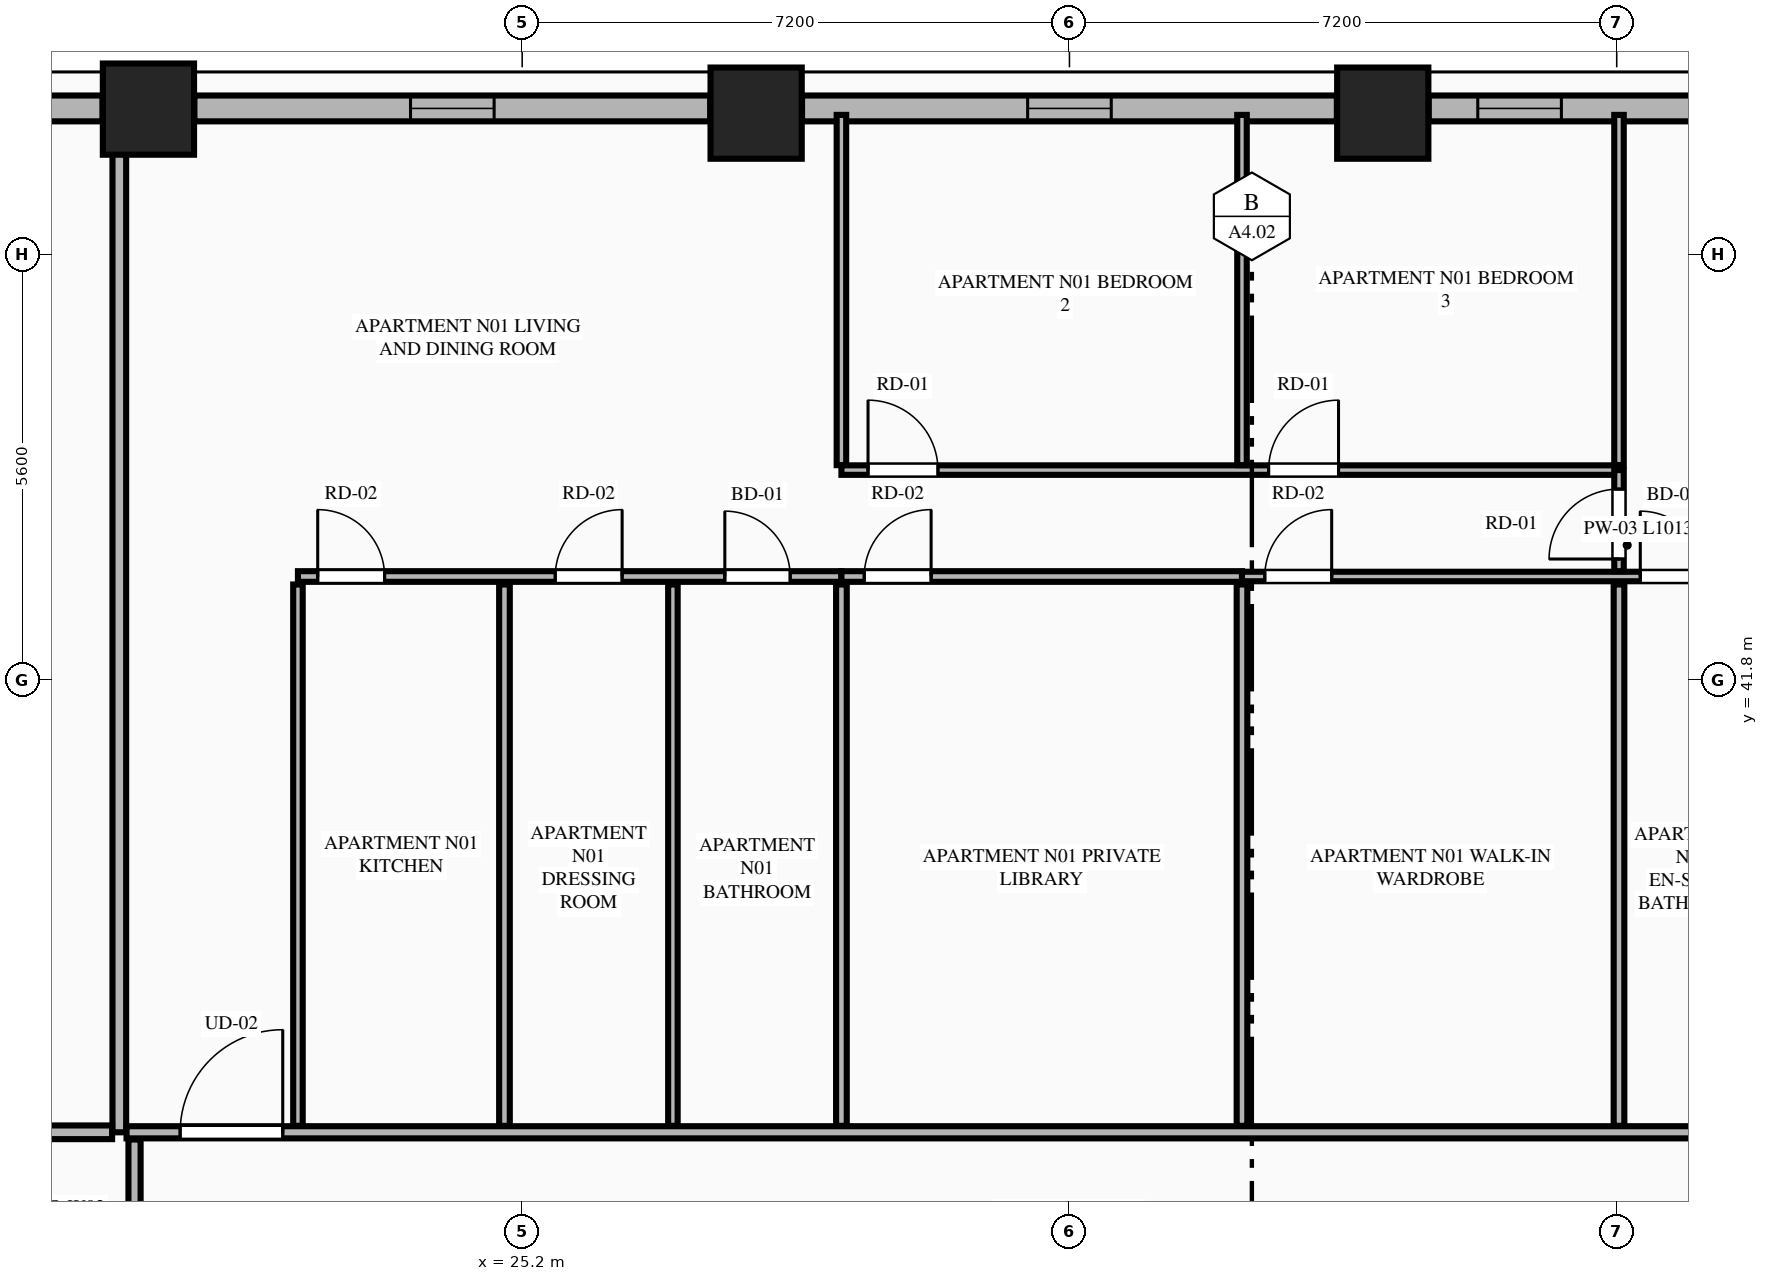
"""IFC4 building model, lengths in metres.
Left out: names, types, materials, properties, quantities, classifications, styles, units other than length and angle.
Written with IfcOpenShell. Run it as: python <this file> out.ifc"""

import sys

from ifc_helpers import new_model, si_unit, direction, frame, frame_2d, origin, origin_2d, place, context, subcontext, project, spatial, rectangle, extrude, element, fill, save


model = new_model("IFC4")
c1 = context("Model", 3, precision=1e-05, world=origin(), true_north=direction((0.0, 1.0)))
c2 = subcontext(c1, "Body", "Model", "MODEL_VIEW")
j1 = project(units=[si_unit("LENGTHUNIT", "METRE"), si_unit("PLANEANGLEUNIT", "RADIAN")], contexts=[c1])
p1 = place(None, origin())
s1 = spatial("IfcSite", under=j1, at=p1, CompositionType="ELEMENT")
p2 = place(p1, origin())
s2 = spatial("IfcBuilding", under=s1, at=p2, CompositionType="ELEMENT")
p3 = place(p2, frame((0.0, 0.0, 39.1)))
s3 = spatial("IfcBuildingStorey", under=s2, at=p3, CompositionType="ELEMENT", Elevation=39.1)
for number, where, z_axis, x_axis in (
    (1, (36.522, 49.258, 0.0), (0.0, 0.0, 1.0), (1.0, 0.0, 0.0)),
    (2, (28.278, 49.258, 0.0), (0.0, 0.0, 1.0), (1.0, 0.0, 0.0)),
    (3, (20.283, 49.311, 0.0), (0.0, 0.0, 1.0), (1.0, 0.0, 0.0)),
):
    element("IfcColumn", number, at=place(p3, frame(where, z_axis=z_axis, x_axis=x_axis)), inside=s3, PredefinedType="COLUMN", context=c2, shape_type="SweptSolid", body=[
        extrude(rectangle(XDim=1.2, YDim=1.2, at=origin_2d()), origin(), (0.0, 0.0, 1.0), 3.55),
    ])
p4 = place(p3, frame((43.913, 49.32, 0.0), z_axis=(0.0, 0.0, 1.0), x_axis=(-1.0, 0.0, 0.0)))
e4 = element("IfcWall", 4, at=p4, inside=s3, PredefinedType="STANDARD", context=c2, shape_type="SweptSolid", body=[
    extrude(rectangle(XDim=6.787, YDim=0.34, at=frame_2d((3.394, 0.0))), origin(), (0.0, 0.0, 1.0), 2.787),
])
p5 = place(p4, frame((1.535, 0.0, 0.75)))
e5 = element("IfcOpeningElement", 5, at=p5, cuts=e4, PredefinedType="OPENING", context=c2, shape_type="SweptSolid", body=[
    extrude(rectangle(XDim=1.1, YDim=1.887, at=frame_2d((0.55, 0.943))), frame((0.0, 0.18, 0.0), z_axis=(0.0, -1.0, 0.0), x_axis=(1.0, 0.0, 0.0)), (0.0, 0.0, 1.0), 0.36),
])
p6 = place(p4, frame((5.041, 0.0, 0.75)))
e6 = element("IfcOpeningElement", 6, at=p6, cuts=e4, PredefinedType="OPENING", context=c2, shape_type="SweptSolid", body=[
    extrude(rectangle(XDim=1.1, YDim=1.887, at=frame_2d((0.55, 0.943))), frame((0.0, 0.18, 0.0), z_axis=(0.0, -1.0, 0.0), x_axis=(1.0, 0.0, 0.0)), (0.0, 0.0, 1.0), 0.36),
])
p7 = place(p3, frame((35.918, 49.32, 0.0), z_axis=(0.0, 0.0, 1.0), x_axis=(-1.0, 0.0, 0.0)))
e7 = element("IfcWall", 7, at=p7, inside=s3, PredefinedType="STANDARD", context=c2, shape_type="SweptSolid", body=[
    extrude(rectangle(XDim=7.036, YDim=0.34, at=frame_2d((3.518, 0.0))), origin(), (0.0, 0.0, 1.0), 2.787),
])
p8 = place(p7, frame((2.968, 0.0, 0.75)))
e8 = element("IfcOpeningElement", 8, at=p8, cuts=e7, PredefinedType="OPENING", context=c2, shape_type="SweptSolid", body=[
    extrude(rectangle(XDim=1.1, YDim=1.887, at=frame_2d((0.55, 0.943))), frame((0.0, 0.18, 0.0), z_axis=(0.0, -1.0, 0.0), x_axis=(1.0, 0.0, 0.0)), (0.0, 0.0, 1.0), 0.36),
])
p9 = place(p3, frame((27.674, 49.32, 0.0), z_axis=(0.0, 0.0, 1.0), x_axis=(-1.0, 0.0, 0.0)))
e9 = element("IfcWall", 9, at=p9, inside=s3, PredefinedType="STANDARD", context=c2, shape_type="SweptSolid", body=[
    extrude(rectangle(XDim=6.787, YDim=0.34, at=frame_2d((3.394, 0.0))), origin(), (0.0, 0.0, 1.0), 2.787),
])
p10 = place(p9, frame((2.843, 0.0, 0.75)))
e10 = element("IfcOpeningElement", 10, at=p10, cuts=e9, PredefinedType="OPENING", context=c2, shape_type="SweptSolid", body=[
    extrude(rectangle(XDim=1.1, YDim=1.887, at=frame_2d((0.55, 0.943))), frame((0.0, 0.18, 0.0), z_axis=(0.0, -1.0, 0.0), x_axis=(1.0, 0.0, 0.0)), (0.0, 0.0, 1.0), 0.36),
])
p11 = place(p3, frame((19.679, 49.32, 0.0), z_axis=(0.0, 0.0, 1.0), x_axis=(-1.0, 0.0, 0.0)))
e11 = element("IfcWall", 11, at=p11, inside=s3, PredefinedType="STANDARD", context=c2, shape_type="SweptSolid", body=[
    extrude(rectangle(XDim=1.245, YDim=0.34, at=frame_2d((0.623, 0.0))), origin(), (0.0, 0.0, 1.0), 3.33),
])
p12 = place(p3, frame((19.9, 35.85, 0.0), z_axis=(0.0, 0.0, 1.0), x_axis=(0.0, 1.0, 0.0)))
e12 = element("IfcWall", 12, at=p12, inside=s3, PredefinedType="PARTITIONING", context=c2, shape_type="SweptSolid", body=[
    extrude(rectangle(XDim=13.295, YDim=0.18, at=frame_2d((6.647, 0.0))), origin(), (0.0, 0.0, 1.0), 3.33),
])
p13 = place(p3, frame((19.995, 35.85, 0.0), z_axis=(0.0, 0.0, 1.0), x_axis=(1.0, 0.0, 0.0)))
e13 = element("IfcWall", 13, at=p13, inside=s3, PredefinedType="PARTITIONING", context=c2, shape_type="SweptSolid", body=[
    extrude(rectangle(XDim=24.81, YDim=0.16, at=frame_2d((12.405, 0.0))), origin(), (0.0, 0.0, 1.0), 3.33),
])
p14 = place(p13, frame((0.705, 0.0, 0.0)))
e14 = element("IfcOpeningElement", 14, at=p14, cuts=e13, PredefinedType="OPENING", context=c2, shape_type="SweptSolid", body=[
    extrude(rectangle(XDim=1.35, YDim=2.35, at=frame_2d((0.675, 1.175))), frame((0.0, 0.09, 0.0), z_axis=(0.0, -1.0, 0.0), x_axis=(1.0, 0.0, 0.0)), (0.0, 0.0, 1.0), 0.18),
])
p15 = place(p3, frame((22.25, 35.935, 0.0), z_axis=(0.0, 0.0, 1.0), x_axis=(0.0, 1.0, 0.0)))
e15 = element("IfcWall", 15, at=p15, inside=s3, PredefinedType="PARTITIONING", context=c2, shape_type="SweptSolid", body=[
    extrude(rectangle(XDim=7.122, YDim=0.125, at=frame_2d((3.561, 0.0))), origin(), (0.0, 0.0, 1.0), 2.636),
])
p16 = place(p3, frame((22.25, 43.162, 0.0), z_axis=(0.0, 0.0, 1.0), x_axis=(1.0, 0.0, 0.0)))
e16 = element("IfcWall", 16, at=p16, inside=s3, PredefinedType="PLUMBINGWALL", context=c2, shape_type="SweptSolid", body=[
    extrude(rectangle(XDim=7.15, YDim=0.14, at=frame_2d((3.575, 0.0))), origin(), (0.0, 0.0, 1.0), 3.33),
])
p17 = place(p16, frame((5.616, 0.0, 0.0)))
e17 = element("IfcOpeningElement", 17, at=p17, cuts=e16, PredefinedType="OPENING", context=c2, shape_type="SweptSolid", body=[
    extrude(rectangle(XDim=0.86, YDim=2.1, at=frame_2d((0.43, 1.05))), frame((0.0, 0.08, 0.0), z_axis=(0.0, -1.0, 0.0), x_axis=(1.0, 0.0, 0.0)), (0.0, 0.0, 1.0), 0.16),
])
p18 = place(p16, frame((0.26, 0.0, 0.0)))
e18 = element("IfcOpeningElement", 18, at=p18, cuts=e16, PredefinedType="OPENING", context=c2, shape_type="SweptSolid", body=[
    extrude(rectangle(XDim=0.88, YDim=2.15, at=frame_2d((0.44, 1.075))), frame((0.0, 0.08, 0.0), z_axis=(0.0, -1.0, 0.0), x_axis=(1.0, 0.0, 0.0)), (0.0, 0.0, 1.0), 0.16),
])
p19 = place(p16, frame((3.385, 0.0, 0.0)))
e19 = element("IfcOpeningElement", 19, at=p19, cuts=e16, PredefinedType="OPENING", context=c2, shape_type="SweptSolid", body=[
    extrude(rectangle(XDim=0.88, YDim=2.15, at=frame_2d((0.44, 1.075))), frame((0.0, 0.08, 0.0), z_axis=(0.0, -1.0, 0.0), x_axis=(1.0, 0.0, 0.0)), (0.0, 0.0, 1.0), 0.16),
])
p20 = place(p3, frame((29.4, 43.162, 0.0), z_axis=(0.0, 0.0, 1.0), x_axis=(1.0, 0.0, 0.0)))
e20 = element("IfcWall", 20, at=p20, inside=s3, PredefinedType="PLUMBINGWALL", context=c2, shape_type="SweptSolid", body=[
    extrude(rectangle(XDim=5.27, YDim=0.14, at=frame_2d((2.635, 0.0))), origin(), (0.0, 0.0, 1.0), 3.33),
])
p21 = place(p20, frame((0.3, 0.0, 0.0)))
e21 = element("IfcOpeningElement", 21, at=p21, cuts=e20, PredefinedType="OPENING", context=c2, shape_type="SweptSolid", body=[
    extrude(rectangle(XDim=0.88, YDim=2.15, at=frame_2d((0.44, 1.075))), frame((0.0, 0.08, 0.0), z_axis=(0.0, -1.0, 0.0), x_axis=(1.0, 0.0, 0.0)), (0.0, 0.0, 1.0), 0.16),
])
p22 = place(p3, frame((34.67, 43.162, 0.0), z_axis=(0.0, 0.0, 1.0), x_axis=(1.0, 0.0, 0.0)))
e22 = element("IfcWall", 22, at=p22, inside=s3, PredefinedType="PARTITIONING", context=c2, shape_type="SweptSolid", body=[
    extrude(rectangle(XDim=10.135, YDim=0.125, at=frame_2d((5.067, 0.0))), origin(), (0.0, 0.0, 1.0), 3.33),
])
p23 = place(p22, frame((5.24, 0.0, 0.0)))
e23 = element("IfcOpeningElement", 23, at=p23, cuts=e22, PredefinedType="OPENING", context=c2, shape_type="SweptSolid", body=[
    extrude(rectangle(XDim=0.86, YDim=2.1, at=frame_2d((0.43, 1.05))), frame((0.0, 0.073, 0.0), z_axis=(0.0, -1.0, 0.0), x_axis=(1.0, 0.0, 0.0)), (0.0, 0.0, 1.0), 0.145),
])
p24 = place(p22, frame((7.17, 0.0, 0.0)))
e24 = element("IfcOpeningElement", 24, at=p24, cuts=e22, PredefinedType="OPENING", context=c2, shape_type="SweptSolid", body=[
    extrude(rectangle(XDim=0.88, YDim=2.15, at=frame_2d((0.44, 1.075))), frame((0.0, 0.073, 0.0), z_axis=(0.0, -1.0, 0.0), x_axis=(1.0, 0.0, 0.0)), (0.0, 0.0, 1.0), 0.145),
])
p25 = place(p22, frame((0.3, 0.0, 0.0)))
e25 = element("IfcOpeningElement", 25, at=p25, cuts=e22, PredefinedType="OPENING", context=c2, shape_type="SweptSolid", body=[
    extrude(rectangle(XDim=0.88, YDim=2.15, at=frame_2d((0.44, 1.075))), frame((0.0, 0.073, 0.0), z_axis=(0.0, -1.0, 0.0), x_axis=(1.0, 0.0, 0.0)), (0.0, 0.0, 1.0), 0.145),
])
p26 = place(p3, frame((24.967, 35.935, 0.0), z_axis=(0.0, 0.0, 1.0), x_axis=(0.0, 1.0, 0.0)))
e26 = element("IfcWall", 26, at=p26, inside=s3, PredefinedType="PLUMBINGWALL", context=c2, shape_type="SweptSolid", body=[
    extrude(rectangle(XDim=7.122, YDim=0.14, at=frame_2d((3.561, 0.0))), origin(), (0.0, 0.0, 1.0), 3.33),
])
p27 = place(p3, frame((27.183, 35.935, 0.0), z_axis=(0.0, 0.0, 1.0), x_axis=(0.0, 1.0, 0.0)))
e27 = element("IfcWall", 27, at=p27, inside=s3, PredefinedType="PARTITIONING", context=c2, shape_type="SweptSolid", body=[
    extrude(rectangle(XDim=7.122, YDim=0.125, at=frame_2d((3.561, 0.0))), origin(), (0.0, 0.0, 1.0), 3.33),
])
p28 = place(p3, frame((29.4, 44.627, 0.0), z_axis=(0.0, 0.0, 1.0), x_axis=(0.0, 1.0, 0.0)))
e28 = element("IfcWall", 28, at=p28, inside=s3, PredefinedType="PARTITIONING", context=c2, shape_type="SweptSolid", body=[
    extrude(rectangle(XDim=4.608, YDim=0.125, at=frame_2d((2.304, 0.0))), origin(), (0.0, 0.0, 1.0), 3.33),
])
p29 = place(p3, frame((29.4, 44.562, 0.0), z_axis=(0.0, 0.0, 1.0), x_axis=(1.0, 0.0, 0.0)))
e29 = element("IfcWall", 29, at=p29, inside=s3, PredefinedType="PARTITIONING", context=c2, shape_type="SweptSolid", body=[
    extrude(rectangle(XDim=10.23, YDim=0.125, at=frame_2d((5.115, 0.0))), origin(), (0.0, 0.0, 1.0), 3.33),
])
p30 = place(p29, frame((0.35, 0.0, 0.0)))
e30 = element("IfcOpeningElement", 30, at=p30, cuts=e29, PredefinedType="OPENING", context=c2, shape_type="SweptSolid", body=[
    extrude(rectangle(XDim=0.92, YDim=2.15, at=frame_2d((0.46, 1.075))), frame((0.0, 0.073, 0.0), z_axis=(0.0, -1.0, 0.0), x_axis=(1.0, 0.0, 0.0)), (0.0, 0.0, 1.0), 0.145),
])
p31 = place(p29, frame((5.62, 0.0, 0.0)))
e31 = element("IfcOpeningElement", 31, at=p31, cuts=e29, PredefinedType="OPENING", context=c2, shape_type="SweptSolid", body=[
    extrude(rectangle(XDim=0.92, YDim=2.15, at=frame_2d((0.46, 1.075))), frame((0.0, 0.073, 0.0), z_axis=(0.0, -1.0, 0.0), x_axis=(1.0, 0.0, 0.0)), (0.0, 0.0, 1.0), 0.145),
])
p32 = place(p3, frame((39.63, 43.232, 0.0), z_axis=(0.0, 0.0, 1.0), x_axis=(0.0, 1.0, 0.0)))
e32 = element("IfcWall", 32, at=p32, inside=s3, PredefinedType="PARTITIONING", context=c2, shape_type="SweptSolid", body=[
    extrude(rectangle(XDim=1.33, YDim=0.125, at=frame_2d((0.665, 0.0))), origin(), (0.0, 0.0, 1.0), 3.33),
])
p33 = place(p32, frame((0.16, 0.0, 0.0)))
e33 = element("IfcOpeningElement", 33, at=p33, cuts=e32, PredefinedType="OPENING", context=c2, shape_type="SweptSolid", body=[
    extrude(rectangle(XDim=0.92, YDim=2.15, at=frame_2d((0.46, 1.075))), frame((0.0, 0.073, 0.0), z_axis=(0.0, -1.0, 0.0), x_axis=(1.0, 0.0, 0.0)), (0.0, 0.0, 1.0), 0.145),
])
for number, where, z_axis, x_axis in (
    (34, (29.4, 35.935, 0.0), (0.0, 0.0, 1.0), (0.0, 1.0, 0.0)),
    (35, (34.67, 35.935, 0.0), (0.0, 0.0, 1.0), (0.0, 1.0, 0.0)),
):
    element("IfcWall", number, at=place(p3, frame(where, z_axis=z_axis, x_axis=x_axis)), inside=s3, PredefinedType="PLUMBINGWALL", context=c2, shape_type="SweptSolid", body=[
        extrude(rectangle(XDim=7.122, YDim=0.14, at=frame_2d((3.561, 0.0))), origin(), (0.0, 0.0, 1.0), 3.33),
    ])
for number, where, z_axis, x_axis in (
    (36, (34.67, 44.627, 0.0), (0.0, 0.0, 1.0), (0.0, 1.0, 0.0)),
    (37, (39.63, 44.627, 0.0), (0.0, 0.0, 1.0), (0.0, 1.0, 0.0)),
):
    element("IfcWall", number, at=place(p3, frame(where, z_axis=z_axis, x_axis=x_axis)), inside=s3, PredefinedType="PARTITIONING", context=c2, shape_type="SweptSolid", body=[
        extrude(rectangle(XDim=4.608, YDim=0.125, at=frame_2d((2.304, 0.0))), origin(), (0.0, 0.0, 1.0), 3.33),
    ])
p34 = place(p3, frame((39.63, 35.935, 0.0), z_axis=(0.0, 0.0, 1.0), x_axis=(0.0, 1.0, 0.0)))
e38 = element("IfcWall", 38, at=p34, inside=s3, PredefinedType="PLUMBINGWALL", context=c2, shape_type="SweptSolid", body=[
    extrude(rectangle(XDim=7.122, YDim=0.14, at=frame_2d((3.561, 0.0))), origin(), (0.0, 0.0, 1.0), 3.33),
])
p35 = place(p3, frame((10.665, 35.85, 0.0), z_axis=(0.0, 0.0, 1.0), x_axis=(1.0, 0.0, 0.0)))
e39 = element("IfcWall", 39, at=p35, inside=s3, PredefinedType="PARTITIONING", context=c2, shape_type="SweptSolid", body=[
    extrude(rectangle(XDim=9.14, YDim=0.18, at=frame_2d((4.57, 0.0))), origin(), (0.0, 0.0, 1.0), 3.33),
])
p36 = place(p3, frame((20.1, 29.577, 0.0), z_axis=(0.0, 0.0, 1.0), x_axis=(0.0, 1.0, 0.0)))
e40 = element("IfcWall", 40, at=p36, inside=s3, PredefinedType="PARTITIONING", context=c2, shape_type="SweptSolid", body=[
    extrude(rectangle(XDim=6.178, YDim=0.16, at=frame_2d((3.089, 0.0))), origin(), (0.0, 0.0, 1.0), 3.33),
])
p37 = place(p36, frame((0.4, 0.0, 0.0)))
e41 = element("IfcOpeningElement", 41, at=p37, cuts=e40, PredefinedType="OPENING", context=c2, shape_type="SweptSolid", body=[
    extrude(rectangle(XDim=1.02, YDim=2.25, at=frame_2d((0.51, 1.125))), frame((0.0, 0.09, 0.0), z_axis=(0.0, -1.0, 0.0), x_axis=(1.0, 0.0, 0.0)), (0.0, 0.0, 1.0), 0.18),
])
p38 = place(p8, origin())
e42 = element("IfcWindow", 42, at=p38, inside=s3, PartitioningType="SINGLE_PANEL", PredefinedType="WINDOW", context=c2, shape_type="SweptSolid", body=[
    extrude(rectangle(XDim=1.1, YDim=1.887, at=frame_2d((0.55, 0.943))), frame((0.0, 0.03, 0.0), z_axis=(0.0, -1.0, 0.0), x_axis=(1.0, 0.0, 0.0)), (0.0, 0.0, 1.0), 0.06),
])
fill(e8, e42)
p39 = place(p10, origin())
e43 = element("IfcWindow", 43, at=p39, inside=s3, PartitioningType="SINGLE_PANEL", PredefinedType="WINDOW", context=c2, shape_type="SweptSolid", body=[
    extrude(rectangle(XDim=1.1, YDim=1.887, at=frame_2d((0.55, 0.943))), frame((0.0, 0.03, 0.0), z_axis=(0.0, -1.0, 0.0), x_axis=(1.0, 0.0, 0.0)), (0.0, 0.0, 1.0), 0.06),
])
fill(e10, e43)
p40 = place(p17, origin())
e44 = element("IfcDoor", 44, at=p40, inside=s3, OperationType="SINGLE_SWING_LEFT", PredefinedType="DOOR", context=c2, shape_type="SweptSolid", body=[
    extrude(rectangle(XDim=0.86, YDim=2.1, at=frame_2d((0.43, 1.05))), frame((0.0, 0.025, 0.0), z_axis=(0.0, -1.0, 0.0), x_axis=(1.0, 0.0, 0.0)), (0.0, 0.0, 1.0), 0.05),
])
fill(e17, e44)
p41 = place(p23, origin())
e45 = element("IfcDoor", 45, at=p41, inside=s3, OperationType="SINGLE_SWING_LEFT", PredefinedType="DOOR", context=c2, shape_type="SweptSolid", body=[
    extrude(rectangle(XDim=0.86, YDim=2.1, at=frame_2d((0.43, 1.05))), frame((0.0, 0.025, 0.0), z_axis=(0.0, -1.0, 0.0), x_axis=(1.0, 0.0, 0.0)), (0.0, 0.0, 1.0), 0.05),
])
fill(e23, e45)
p42 = place(p14, origin())
e46 = element("IfcDoor", 46, at=p42, inside=s3, OperationType="SINGLE_SWING_RIGHT", PredefinedType="DOOR", context=c2, shape_type="SweptSolid", body=[
    extrude(rectangle(XDim=1.35, YDim=2.35, at=frame_2d((0.675, 1.175))), frame((0.0, 0.025, 0.0), z_axis=(0.0, -1.0, 0.0), x_axis=(1.0, 0.0, 0.0)), (0.0, 0.0, 1.0), 0.05),
])
fill(e14, e46)
p43 = place(p18, origin())
e47 = element("IfcDoor", 47, at=p43, inside=s3, OperationType="SINGLE_SWING_LEFT", PredefinedType="DOOR", context=c2, shape_type="SweptSolid", body=[
    extrude(rectangle(XDim=0.88, YDim=2.15, at=frame_2d((0.44, 1.075))), frame((0.0, 0.025, 0.0), z_axis=(0.0, -1.0, 0.0), x_axis=(1.0, 0.0, 0.0)), (0.0, 0.0, 1.0), 0.05),
])
fill(e18, e47)
p44 = place(p19, origin())
e48 = element("IfcDoor", 48, at=p44, inside=s3, OperationType="SINGLE_SWING_RIGHT", PredefinedType="DOOR", context=c2, shape_type="SweptSolid", body=[
    extrude(rectangle(XDim=0.88, YDim=2.15, at=frame_2d((0.44, 1.075))), frame((0.0, 0.025, 0.0), z_axis=(0.0, -1.0, 0.0), x_axis=(1.0, 0.0, 0.0)), (0.0, 0.0, 1.0), 0.05),
])
fill(e19, e48)
p45 = place(p21, origin())
e49 = element("IfcDoor", 49, at=p45, inside=s3, OperationType="SINGLE_SWING_RIGHT", PredefinedType="DOOR", context=c2, shape_type="SweptSolid", body=[
    extrude(rectangle(XDim=0.88, YDim=2.15, at=frame_2d((0.44, 1.075))), frame((0.0, 0.025, 0.0), z_axis=(0.0, -1.0, 0.0), x_axis=(1.0, 0.0, 0.0)), (0.0, 0.0, 1.0), 0.05),
])
fill(e21, e49)
p46 = place(p30, origin())
e50 = element("IfcDoor", 50, at=p46, inside=s3, OperationType="SINGLE_SWING_LEFT", PredefinedType="DOOR", context=c2, shape_type="SweptSolid", body=[
    extrude(rectangle(XDim=0.92, YDim=2.15, at=frame_2d((0.46, 1.075))), frame((0.0, 0.025, 0.0), z_axis=(0.0, -1.0, 0.0), x_axis=(1.0, 0.0, 0.0)), (0.0, 0.0, 1.0), 0.05),
])
fill(e30, e50)
p47 = place(p31, origin())
e51 = element("IfcDoor", 51, at=p47, inside=s3, OperationType="SINGLE_SWING_RIGHT", PredefinedType="DOOR", context=c2, shape_type="SweptSolid", body=[
    extrude(rectangle(XDim=0.92, YDim=2.15, at=frame_2d((0.46, 1.075))), frame((0.0, 0.025, 0.0), z_axis=(0.0, -1.0, 0.0), x_axis=(1.0, 0.0, 0.0)), (0.0, 0.0, 1.0), 0.05),
])
fill(e31, e51)
p48 = place(p33, origin())
e52 = element("IfcDoor", 52, at=p48, inside=s3, OperationType="SINGLE_SWING_LEFT", PredefinedType="DOOR", context=c2, shape_type="SweptSolid", body=[
    extrude(rectangle(XDim=0.92, YDim=2.15, at=frame_2d((0.46, 1.075))), frame((0.0, 0.025, 0.0), z_axis=(0.0, -1.0, 0.0), x_axis=(1.0, 0.0, 0.0)), (0.0, 0.0, 1.0), 0.05),
])
fill(e33, e52)
p49 = place(p25, origin())
e53 = element("IfcDoor", 53, at=p49, inside=s3, OperationType="SINGLE_SWING_RIGHT", PredefinedType="DOOR", context=c2, shape_type="SweptSolid", body=[
    extrude(rectangle(XDim=0.88, YDim=2.15, at=frame_2d((0.44, 1.075))), frame((0.0, 0.025, 0.0), z_axis=(0.0, -1.0, 0.0), x_axis=(1.0, 0.0, 0.0)), (0.0, 0.0, 1.0), 0.05),
])
fill(e25, e53)
p50 = place(p6, origin())
e54 = element("IfcWindow", 54, at=p50, inside=s3, PartitioningType="SINGLE_PANEL", PredefinedType="WINDOW", context=c2, shape_type="SweptSolid", body=[
    extrude(rectangle(XDim=1.1, YDim=1.887, at=frame_2d((0.55, 0.943))), frame((0.0, 0.03, 0.0), z_axis=(0.0, -1.0, 0.0), x_axis=(1.0, 0.0, 0.0)), (0.0, 0.0, 1.0), 0.06),
])
fill(e6, e54)
save(model, sys.argv[1])
